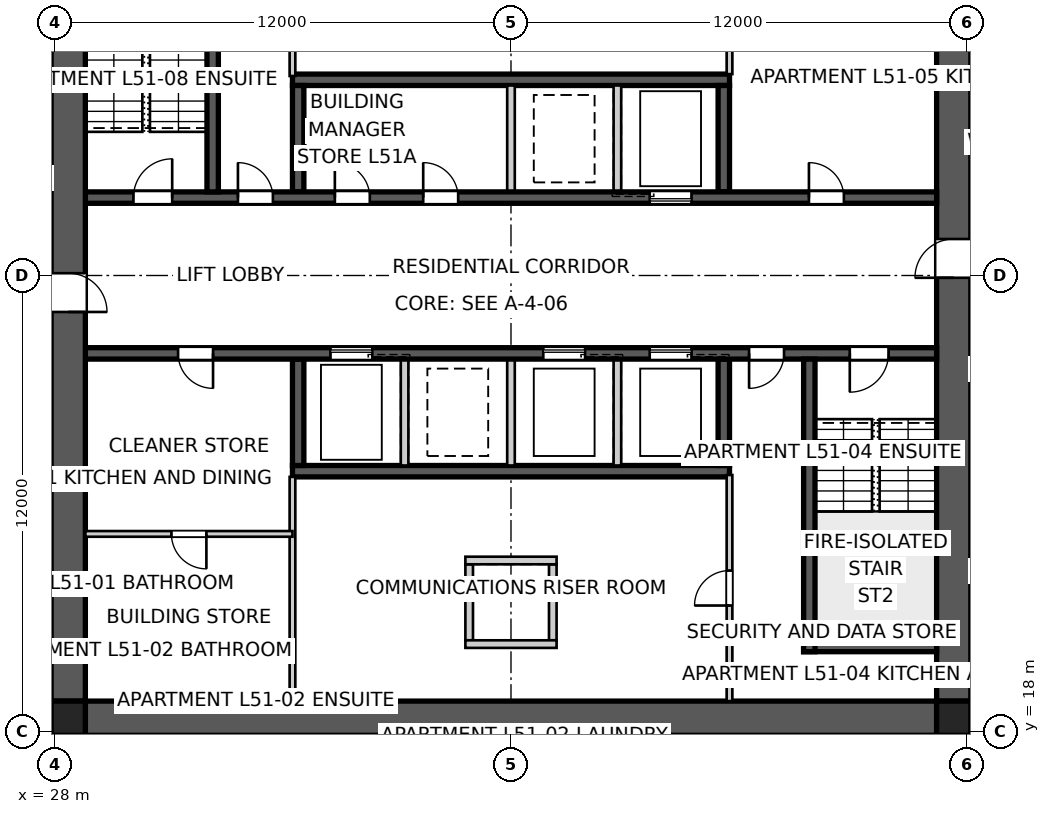
"""IFC4 building model, lengths in metres.
Left out: names, types, materials, properties, quantities, classifications, styles, units other than length and angle.
Written with IfcOpenShell. Run it as: python <this file> out.ifc"""

import sys

from ifc_helpers import new_model, si_unit, direction, frame, frame_2d, origin, origin_2d, place, context, subcontext, project, spatial, polyline, rectangle, outline, extrude, element, fill, save


model = new_model("IFC4")
c1 = context("Model", 3, precision=1e-05, world=origin(), true_north=direction((0.0, 1.0)))
c2 = subcontext(c1, "Body", "Model", "MODEL_VIEW")
j1 = project(units=[si_unit("LENGTHUNIT", "METRE"), si_unit("PLANEANGLEUNIT", "RADIAN")], contexts=[c1])
p1 = place(None, origin())
s1 = spatial("IfcSite", under=j1, at=p1, CompositionType="ELEMENT")
p2 = place(p1, origin())
s2 = spatial("IfcBuilding", under=s1, at=p2, CompositionType="ELEMENT")
p3 = place(p2, frame((0.0, 0.0, 186.2)))
s3 = spatial("IfcBuildingStorey", under=s2, at=p3, CompositionType="ELEMENT", Elevation=186.2)
p4 = place(p3, frame((51.2, 18.35, 0.0), z_axis=(0.0, 0.0, 1.0), x_axis=(-1.0, 0.0, 0.0)))
e1 = element("IfcWall", 1, at=p4, inside=s3, PredefinedType="SHEAR", context=c2, shape_type="SweptSolid", body=[
    extrude(outline(polyline([(0.0, -0.45), (22.4, -0.45), (22.4, -0.025), (22.85, -0.025), (22.85, 0.025), (22.4, 0.025), (22.4, 0.45), (0.0, 0.45), (0.0, 0.025), (-0.45, 0.025), (-0.45, -0.025), (0.0, -0.025), (0.0, -0.45)])), origin(), (0.0, 0.0, 1.0), 3.4),
])
p5 = place(p3, frame((51.65, 18.8, 0.0), z_axis=(0.0, 0.0, 1.0), x_axis=(0.0, 1.0, 0.0)))
e2 = element("IfcWall", 2, at=p5, inside=s3, PredefinedType="SHEAR", context=c2, shape_type="SweptSolid", body=[
    extrude(outline(polyline([(0.0, -0.45), (22.4, -0.45), (22.4, -0.025), (22.85, -0.025), (22.85, 0.025), (22.4, 0.025), (22.4, 0.45), (0.0, 0.45), (0.0, 0.025), (-0.45, 0.025), (-0.45, -0.025), (0.0, -0.025), (0.0, -0.45)])), origin(), (0.0, 0.0, 1.0), 3.4),
])
p6 = place(p5, frame((11.14, 0.0, 0.0)))
e3 = element("IfcOpeningElement", 3, at=p6, cuts=e2, PredefinedType="OPENING", context=c2, shape_type="SweptSolid", body=[
    extrude(rectangle(XDim=1.02, YDim=2.4, at=frame_2d((0.51, 1.2))), frame((0.0, 0.46, 0.0), z_axis=(0.0, -1.0, 0.0), x_axis=(1.0, 0.0, 0.0)), (0.0, 0.0, 1.0), 0.92),
])
p7 = place(p3, frame((28.35, 41.2, 0.0), z_axis=(0.0, 0.0, 1.0), x_axis=(0.0, -1.0, 0.0)))
e4 = element("IfcWall", 4, at=p7, inside=s3, PredefinedType="SHEAR", context=c2, shape_type="SweptSolid", body=[
    extrude(outline(polyline([(0.0, -0.45), (22.4, -0.45), (22.4, -0.025), (22.85, -0.025), (22.85, 0.025), (22.4, 0.025), (22.4, 0.45), (0.0, 0.45), (0.0, 0.025), (-0.45, 0.025), (-0.45, -0.025), (0.0, -0.025), (0.0, -0.45)])), origin(), (0.0, 0.0, 1.0), 3.4),
])
p8 = place(p7, frame((11.14, 0.0, 0.0)))
e5 = element("IfcOpeningElement", 5, at=p8, cuts=e4, PredefinedType="OPENING", context=c2, shape_type="SweptSolid", body=[
    extrude(rectangle(XDim=1.02, YDim=2.4, at=frame_2d((0.51, 1.2))), frame((0.0, 0.46, 0.0), z_axis=(0.0, -1.0, 0.0), x_axis=(1.0, 0.0, 0.0)), (0.0, 0.0, 1.0), 0.92),
])
p9 = place(p3, frame((28.8, 32.05, 0.0), z_axis=(0.0, 0.0, 1.0), x_axis=(1.0, 0.0, 0.0)))
e6 = element("IfcWall", 6, at=p9, inside=s3, PredefinedType="SHEAR", context=c2, shape_type="SweptSolid", body=[
    extrude(rectangle(XDim=22.4, YDim=0.3, at=frame_2d((11.2, 0.0))), origin(), (0.0, 0.0, 1.0), 3.4),
])
p10 = place(p9, frame((19.04, 0.0, 0.0)))
e7 = element("IfcOpeningElement", 7, at=p10, cuts=e6, PredefinedType="OPENING", context=c2, shape_type="SweptSolid", body=[
    extrude(rectangle(XDim=0.92, YDim=2.1, at=frame_2d((0.46, 1.05))), frame((0.0, 0.16, 0.0), z_axis=(0.0, -1.0, 0.0), x_axis=(1.0, 0.0, 0.0)), (0.0, 0.0, 1.0), 0.32),
])
p11 = place(p9, frame((1.265, 0.0, 0.0)))
e8 = element("IfcOpeningElement", 8, at=p11, cuts=e6, PredefinedType="OPENING", context=c2, shape_type="SweptSolid", body=[
    extrude(rectangle(XDim=1.02, YDim=2.1, at=frame_2d((0.51, 1.05))), frame((0.0, 0.16, 0.0), z_axis=(0.0, -1.0, 0.0), x_axis=(1.0, 0.0, 0.0)), (0.0, 0.0, 1.0), 0.32),
])
p12 = place(p9, frame((4.015, 0.0, 0.0)))
e9 = element("IfcOpeningElement", 9, at=p12, cuts=e6, PredefinedType="OPENING", context=c2, shape_type="SweptSolid", body=[
    extrude(rectangle(XDim=0.92, YDim=2.1, at=frame_2d((0.46, 1.05))), frame((0.0, 0.16, 0.0), z_axis=(0.0, -1.0, 0.0), x_axis=(1.0, 0.0, 0.0)), (0.0, 0.0, 1.0), 0.32),
])
p13 = place(p9, frame((6.565, 0.0, 0.0)))
e10 = element("IfcOpeningElement", 10, at=p13, cuts=e6, PredefinedType="OPENING", context=c2, shape_type="SweptSolid", body=[
    extrude(rectangle(XDim=0.92, YDim=2.1, at=frame_2d((0.46, 1.05))), frame((0.0, 0.16, 0.0), z_axis=(0.0, -1.0, 0.0), x_axis=(1.0, 0.0, 0.0)), (0.0, 0.0, 1.0), 0.32),
])
p14 = place(p9, frame((8.89, 0.0, 0.0)))
e11 = element("IfcOpeningElement", 11, at=p14, cuts=e6, PredefinedType="OPENING", context=c2, shape_type="SweptSolid", body=[
    extrude(rectangle(XDim=0.92, YDim=2.1, at=frame_2d((0.46, 1.05))), frame((0.0, 0.16, 0.0), z_axis=(0.0, -1.0, 0.0), x_axis=(1.0, 0.0, 0.0)), (0.0, 0.0, 1.0), 0.32),
])
p15 = place(p9, frame((14.85, 0.0, 0.0)))
e12 = element("IfcOpeningElement", 12, at=p15, cuts=e6, PredefinedType="OPENING", context=c2, shape_type="SweptSolid", body=[
    extrude(rectangle(XDim=1.1, YDim=2.1, at=frame_2d((0.55, 1.05))), frame((0.0, 0.16, 0.0), z_axis=(0.0, -1.0, 0.0), x_axis=(1.0, 0.0, 0.0)), (0.0, 0.0, 1.0), 0.32),
])
p16 = place(p3, frame((51.2, 27.95, 0.0), z_axis=(0.0, 0.0, 1.0), x_axis=(-1.0, 0.0, 0.0)))
e13 = element("IfcWall", 13, at=p16, inside=s3, PredefinedType="SHEAR", context=c2, shape_type="SweptSolid", body=[
    extrude(rectangle(XDim=22.4, YDim=0.3, at=frame_2d((11.2, 0.0))), origin(), (0.0, 0.0, 1.0), 3.4),
])
p17 = place(p16, frame((19.04, 0.0, 0.0)))
e14 = element("IfcOpeningElement", 14, at=p17, cuts=e13, PredefinedType="OPENING", context=c2, shape_type="SweptSolid", body=[
    extrude(rectangle(XDim=0.92, YDim=2.1, at=frame_2d((0.46, 1.05))), frame((0.0, 0.16, 0.0), z_axis=(0.0, -1.0, 0.0), x_axis=(1.0, 0.0, 0.0)), (0.0, 0.0, 1.0), 0.32),
])
p18 = place(p16, frame((1.265, 0.0, 0.0)))
e15 = element("IfcOpeningElement", 15, at=p18, cuts=e13, PredefinedType="OPENING", context=c2, shape_type="SweptSolid", body=[
    extrude(rectangle(XDim=1.02, YDim=2.1, at=frame_2d((0.51, 1.05))), frame((0.0, 0.16, 0.0), z_axis=(0.0, -1.0, 0.0), x_axis=(1.0, 0.0, 0.0)), (0.0, 0.0, 1.0), 0.32),
])
p19 = place(p16, frame((4.015, 0.0, 0.0)))
e16 = element("IfcOpeningElement", 16, at=p19, cuts=e13, PredefinedType="OPENING", context=c2, shape_type="SweptSolid", body=[
    extrude(rectangle(XDim=0.92, YDim=2.1, at=frame_2d((0.46, 1.05))), frame((0.0, 0.16, 0.0), z_axis=(0.0, -1.0, 0.0), x_axis=(1.0, 0.0, 0.0)), (0.0, 0.0, 1.0), 0.32),
])
p20 = place(p16, frame((6.45, 0.0, 0.0)))
e17 = element("IfcOpeningElement", 17, at=p20, cuts=e13, PredefinedType="OPENING", context=c2, shape_type="SweptSolid", body=[
    extrude(rectangle(XDim=1.1, YDim=2.1, at=frame_2d((0.55, 1.05))), frame((0.0, 0.16, 0.0), z_axis=(0.0, -1.0, 0.0), x_axis=(1.0, 0.0, 0.0)), (0.0, 0.0, 1.0), 0.32),
])
p21 = place(p16, frame((9.25, 0.0, 0.0)))
e18 = element("IfcOpeningElement", 18, at=p21, cuts=e13, PredefinedType="OPENING", context=c2, shape_type="SweptSolid", body=[
    extrude(rectangle(XDim=1.1, YDim=2.1, at=frame_2d((0.55, 1.05))), frame((0.0, 0.16, 0.0), z_axis=(0.0, -1.0, 0.0), x_axis=(1.0, 0.0, 0.0)), (0.0, 0.0, 1.0), 0.32),
])
p22 = place(p16, frame((14.85, 0.0, 0.0)))
e19 = element("IfcOpeningElement", 19, at=p22, cuts=e13, PredefinedType="OPENING", context=c2, shape_type="SweptSolid", body=[
    extrude(rectangle(XDim=1.1, YDim=2.1, at=frame_2d((0.55, 1.05))), frame((0.0, 0.16, 0.0), z_axis=(0.0, -1.0, 0.0), x_axis=(1.0, 0.0, 0.0)), (0.0, 0.0, 1.0), 0.32),
])
for number, where, z_axis, x_axis in (
    (20, (34.25, 35.15, 0.0), (0.0, 0.0, 1.0), (1.0, 0.0, 0.0)),
    (21, (45.75, 24.85, 0.0), (0.0, 0.0, 1.0), (-1.0, 0.0, 0.0)),
):
    element("IfcWall", number, at=place(p3, frame(where, z_axis=z_axis, x_axis=x_axis)), inside=s3, PredefinedType="SHEAR", context=c2, shape_type="SweptSolid", body=[
        extrude(rectangle(XDim=11.5, YDim=0.3, at=frame_2d((5.75, 0.0))), origin(), (0.0, 0.0, 1.0), 3.4),
    ])
for number, where, z_axis, x_axis in (
    (22, (34.4, 32.2, 0.0), (0.0, 0.0, 1.0), (0.0, 1.0, 0.0)),
    (23, (45.6, 27.8, 0.0), (0.0, 0.0, 1.0), (0.0, -1.0, 0.0)),
):
    element("IfcWall", number, at=place(p3, frame(where, z_axis=z_axis, x_axis=x_axis)), inside=s3, PredefinedType="SHEAR", context=c2, shape_type="SweptSolid", body=[
        extrude(rectangle(XDim=2.8, YDim=0.3, at=frame_2d((1.4, 0.0))), origin(), (0.0, 0.0, 1.0), 3.4),
    ])
for number, where, z_axis, x_axis in (
    (24, (42.8, 27.8, 0.0), (0.0, 0.0, 1.0), (0.0, -1.0, 0.0)),
    (25, (40.0, 32.2, 0.0), (0.0, 0.0, 1.0), (0.0, 1.0, 0.0)),
    (26, (40.0, 27.8, 0.0), (0.0, 0.0, 1.0), (0.0, -1.0, 0.0)),
    (27, (42.8, 32.2, 0.0), (0.0, 0.0, 1.0), (0.0, 1.0, 0.0)),
    (28, (37.2, 27.8, 0.0), (0.0, 0.0, 1.0), (0.0, -1.0, 0.0)),
):
    element("IfcWall", number, at=place(p3, frame(where, z_axis=z_axis, x_axis=x_axis)), inside=s3, PredefinedType="SOLIDWALL", context=c2, shape_type="SweptSolid", body=[
        extrude(rectangle(XDim=2.8, YDim=0.2, at=frame_2d((1.4, 0.0))), origin(), (0.0, 0.0, 1.0), 3.4),
    ])
for number, where, z_axis, x_axis in (
    (29, (45.6, 32.2, 0.0), (0.0, 0.0, 1.0), (0.0, 1.0, 0.0)),
    (30, (34.4, 27.8, 0.0), (0.0, 0.0, 1.0), (0.0, -1.0, 0.0)),
):
    element("IfcWall", number, at=place(p3, frame(where, z_axis=z_axis, x_axis=x_axis)), inside=s3, PredefinedType="SHEAR", context=c2, shape_type="SweptSolid", body=[
        extrude(rectangle(XDim=2.8, YDim=0.3, at=frame_2d((1.4, 0.0))), origin(), (0.0, 0.0, 1.0), 3.4),
    ])
for number, where, z_axis, x_axis in (
    (31, (32.15, 32.2, 0.0), (0.0, 0.0, 1.0), (0.0, 1.0, 0.0)),
    (32, (47.85, 27.8, 0.0), (0.0, 0.0, 1.0), (0.0, -1.0, 0.0)),
):
    element("IfcWall", number, at=place(p3, frame(where, z_axis=z_axis, x_axis=x_axis)), inside=s3, PredefinedType="SHEAR", context=c2, shape_type="SweptSolid", body=[
        extrude(rectangle(XDim=7.7, YDim=0.3, at=frame_2d((3.85, 0.0))), origin(), (0.0, 0.0, 1.0), 3.4),
    ])
p23 = place(p3, frame((51.2, 20.25, 0.0), z_axis=(0.0, 0.0, 1.0), x_axis=(-1.0, 0.0, 0.0)))
e33 = element("IfcWall", 33, at=p23, inside=s3, PredefinedType="SHEAR", context=c2, shape_type="SweptSolid", body=[
    extrude(rectangle(XDim=3.5, YDim=0.3, at=frame_2d((1.75, 0.0))), origin(), (0.0, 0.0, 1.0), 3.4),
])
for number, where, z_axis, x_axis in (
    (34, (38.9, 22.4, 0.0), (0.0, 0.0, 1.0), (0.0, -1.0, 0.0)),
    (35, (41.1, 22.4, 0.0), (0.0, 0.0, 1.0), (0.0, -1.0, 0.0)),
):
    element("IfcWall", number, at=place(p3, frame(where, z_axis=z_axis, x_axis=x_axis)), inside=s3, PredefinedType="SOLIDWALL", context=c2, shape_type="SweptSolid", body=[
        extrude(rectangle(XDim=2.0, YDim=0.2, at=frame_2d((1.0, 0.0))), origin(), (0.0, 0.0, 1.0), 3.4),
    ])
for number, where, z_axis, x_axis in (
    (36, (38.8, 22.5, 0.0), (0.0, 0.0, 1.0), (1.0, 0.0, 0.0)),
    (37, (38.8, 20.3, 0.0), (0.0, 0.0, 1.0), (1.0, 0.0, 0.0)),
):
    element("IfcWall", number, at=place(p3, frame(where, z_axis=z_axis, x_axis=x_axis)), inside=s3, PredefinedType="SOLIDWALL", context=c2, shape_type="SweptSolid", body=[
        extrude(rectangle(XDim=2.4, YDim=0.2, at=frame_2d((1.2, 0.0))), origin(), (0.0, 0.0, 1.0), 3.4),
    ])
for number, where, z_axis, x_axis in (
    (38, (28.35, 18.35, 0.0), (0.0, 0.0, 1.0), (1.0, 0.0, 0.0)),
    (39, (51.65, 18.35, 0.0), (0.0, 0.0, 1.0), (1.0, 0.0, 0.0)),
):
    element("IfcColumn", number, at=place(p3, frame(where, z_axis=z_axis, x_axis=x_axis)), inside=s3, PredefinedType="COLUMN", context=c2, shape_type="SweptSolid", body=[
        extrude(rectangle(XDim=0.9, YDim=0.9, at=origin_2d()), origin(), (0.0, 0.0, 1.0), 3.4),
    ])
p24 = place(p3, frame((34.25, 41.2, 0.0), z_axis=(0.0, 0.0, 1.0), x_axis=(0.0, -1.0, 0.0)))
e40 = element("IfcWall", 40, at=p24, inside=s3, PredefinedType="SOLIDWALL", context=c2, shape_type="SweptSolid", body=[
    extrude(rectangle(XDim=5.95, YDim=0.15, at=frame_2d((2.975, 0.0))), origin(), (0.0, 0.0, 1.0), 3.25),
])
p25 = place(p24, frame((2.515, 0.0, 0.0)))
e41 = element("IfcOpeningElement", 41, at=p25, cuts=e40, PredefinedType="OPENING", context=c2, shape_type="SweptSolid", body=[
    extrude(rectangle(XDim=0.92, YDim=2.1, at=frame_2d((0.46, 1.05))), frame((0.0, 0.085, 0.0), z_axis=(0.0, -1.0, 0.0), x_axis=(1.0, 0.0, 0.0)), (0.0, 0.0, 1.0), 0.17),
])
p26 = place(p3, frame((45.75, 41.2, 0.0), z_axis=(0.0, 0.0, 1.0), x_axis=(0.0, -1.0, 0.0)))
e42 = element("IfcWall", 42, at=p26, inside=s3, PredefinedType="SOLIDWALL", context=c2, shape_type="SweptSolid", body=[
    extrude(rectangle(XDim=5.9, YDim=0.15, at=frame_2d((2.95, 0.0))), origin(), (0.0, 0.0, 1.0), 3.25),
])
p27 = place(p3, frame((45.75, 18.8, 0.0), z_axis=(0.0, 0.0, 1.0), x_axis=(0.0, 1.0, 0.0)))
e43 = element("IfcWall", 43, at=p27, inside=s3, PredefinedType="SOLIDWALL", context=c2, shape_type="SweptSolid", body=[
    extrude(rectangle(XDim=5.95, YDim=0.15, at=frame_2d((2.975, 0.0))), origin(), (0.0, 0.0, 1.0), 3.25),
])
p28 = place(p27, frame((2.515, 0.0, 0.0)))
e44 = element("IfcOpeningElement", 44, at=p28, cuts=e43, PredefinedType="OPENING", context=c2, shape_type="SweptSolid", body=[
    extrude(rectangle(XDim=0.92, YDim=2.1, at=frame_2d((0.46, 1.05))), frame((0.0, 0.085, 0.0), z_axis=(0.0, -1.0, 0.0), x_axis=(1.0, 0.0, 0.0)), (0.0, 0.0, 1.0), 0.17),
])
p29 = place(p3, frame((34.25, 18.8, 0.0), z_axis=(0.0, 0.0, 1.0), x_axis=(0.0, 1.0, 0.0)))
e45 = element("IfcWall", 45, at=p29, inside=s3, PredefinedType="SOLIDWALL", context=c2, shape_type="SweptSolid", body=[
    extrude(rectangle(XDim=5.9, YDim=0.15, at=frame_2d((2.95, 0.0))), origin(), (0.0, 0.0, 1.0), 3.25),
])
p30 = place(p3, frame((34.25, 23.2, 0.0), z_axis=(0.0, 0.0, 1.0), x_axis=(-1.0, 0.0, 0.0)))
e46 = element("IfcWall", 46, at=p30, inside=s3, PredefinedType="SOLIDWALL", context=c2, shape_type="SweptSolid", body=[
    extrude(rectangle(XDim=5.45, YDim=0.15, at=frame_2d((2.725, 0.0))), origin(), (0.0, 0.0, 1.0), 3.25),
])
p31 = place(p30, frame((2.265, 0.0, 0.0)))
e47 = element("IfcOpeningElement", 47, at=p31, cuts=e46, PredefinedType="OPENING", context=c2, shape_type="SweptSolid", body=[
    extrude(rectangle(XDim=0.92, YDim=2.1, at=frame_2d((0.46, 1.05))), frame((0.0, 0.085, 0.0), z_axis=(0.0, -1.0, 0.0), x_axis=(1.0, 0.0, 0.0)), (0.0, 0.0, 1.0), 0.17),
])
p32 = place(p3, frame((27.9, 17.95, 0.0), z_axis=(0.0, 0.0, 1.0), x_axis=(0.0, -1.0, 0.0)))
e48 = element("IfcWall", 48, at=p32, inside=s3, PredefinedType="PARTITIONING", context=c2, shape_type="SweptSolid", body=[
    extrude(rectangle(XDim=2.3, YDim=0.2, at=frame_2d((1.15, 0.0))), origin(), (0.0, 0.0, 1.0), 3.25),
])
p33 = place(p3, frame((52.1, 15.65, 0.0), z_axis=(0.0, 0.0, 1.0), x_axis=(0.0, 1.0, 0.0)))
e49 = element("IfcWall", 49, at=p33, inside=s3, PredefinedType="PARTITIONING", context=c2, shape_type="SweptSolid", body=[
    extrude(rectangle(XDim=3.17, YDim=0.2, at=frame_2d((1.585, 0.0))), origin(), (0.0, 0.0, 1.0), 3.25),
])
p34 = place(p10, origin())
e50 = element("IfcDoor", 50, at=p34, inside=s3, OperationType="SINGLE_SWING_LEFT", PredefinedType="DOOR", context=c2, shape_type="SweptSolid", body=[
    extrude(rectangle(XDim=0.92, YDim=2.1, at=frame_2d((0.46, 1.05))), frame((0.0, 0.025, 0.0), z_axis=(0.0, -1.0, 0.0), x_axis=(1.0, 0.0, 0.0)), (0.0, 0.0, 1.0), 0.05),
])
fill(e7, e50)
p35 = place(p17, origin())
e51 = element("IfcDoor", 51, at=p35, inside=s3, OperationType="SINGLE_SWING_LEFT", PredefinedType="DOOR", context=c2, shape_type="SweptSolid", body=[
    extrude(rectangle(XDim=0.92, YDim=2.1, at=frame_2d((0.46, 1.05))), frame((0.0, 0.025, 0.0), z_axis=(0.0, -1.0, 0.0), x_axis=(1.0, 0.0, 0.0)), (0.0, 0.0, 1.0), 0.05),
])
fill(e14, e51)
p36 = place(p18, origin())
e52 = element("IfcDoor", 52, at=p36, inside=s3, OperationType="SINGLE_SWING_RIGHT", PredefinedType="DOOR", context=c2, shape_type="SweptSolid", body=[
    extrude(rectangle(XDim=1.02, YDim=2.1, at=frame_2d((0.51, 1.05))), frame((0.0, 0.025, 0.0), z_axis=(0.0, -1.0, 0.0), x_axis=(1.0, 0.0, 0.0)), (0.0, 0.0, 1.0), 0.05),
])
fill(e15, e52)
p37 = place(p11, origin())
e53 = element("IfcDoor", 53, at=p37, inside=s3, OperationType="SINGLE_SWING_RIGHT", PredefinedType="DOOR", context=c2, shape_type="SweptSolid", body=[
    extrude(rectangle(XDim=1.02, YDim=2.1, at=frame_2d((0.51, 1.05))), frame((0.0, 0.025, 0.0), z_axis=(0.0, -1.0, 0.0), x_axis=(1.0, 0.0, 0.0)), (0.0, 0.0, 1.0), 0.05),
])
fill(e8, e53)
p38 = place(p12, origin())
e54 = element("IfcDoor", 54, at=p38, inside=s3, OperationType="SINGLE_SWING_LEFT", PredefinedType="DOOR", context=c2, shape_type="SweptSolid", body=[
    extrude(rectangle(XDim=0.92, YDim=2.1, at=frame_2d((0.46, 1.05))), frame((0.0, 0.025, 0.0), z_axis=(0.0, -1.0, 0.0), x_axis=(1.0, 0.0, 0.0)), (0.0, 0.0, 1.0), 0.05),
])
fill(e9, e54)
p39 = place(p19, origin())
e55 = element("IfcDoor", 55, at=p39, inside=s3, OperationType="SINGLE_SWING_RIGHT", PredefinedType="DOOR", context=c2, shape_type="SweptSolid", body=[
    extrude(rectangle(XDim=0.92, YDim=2.1, at=frame_2d((0.46, 1.05))), frame((0.0, 0.025, 0.0), z_axis=(0.0, -1.0, 0.0), x_axis=(1.0, 0.0, 0.0)), (0.0, 0.0, 1.0), 0.05),
])
fill(e16, e55)
p40 = place(p31, origin())
e56 = element("IfcDoor", 56, at=p40, inside=s3, OperationType="SINGLE_SWING_LEFT", PredefinedType="DOOR", context=c2, shape_type="SweptSolid", body=[
    extrude(rectangle(XDim=0.92, YDim=2.1, at=frame_2d((0.46, 1.05))), frame((0.0, 0.025, 0.0), z_axis=(0.0, -1.0, 0.0), x_axis=(1.0, 0.0, 0.0)), (0.0, 0.0, 1.0), 0.05),
])
fill(e47, e56)
p41 = place(p28, origin())
e57 = element("IfcDoor", 57, at=p41, inside=s3, OperationType="SINGLE_SWING_LEFT", PredefinedType="DOOR", context=c2, shape_type="SweptSolid", body=[
    extrude(rectangle(XDim=0.92, YDim=2.1, at=frame_2d((0.46, 1.05))), frame((0.0, 0.025, 0.0), z_axis=(0.0, -1.0, 0.0), x_axis=(1.0, 0.0, 0.0)), (0.0, 0.0, 1.0), 0.05),
])
fill(e44, e57)
p42 = place(p13, origin())
e58 = element("IfcDoor", 58, at=p42, inside=s3, OperationType="SINGLE_SWING_LEFT", PredefinedType="DOOR", context=c2, shape_type="SweptSolid", body=[
    extrude(rectangle(XDim=0.92, YDim=2.1, at=frame_2d((0.46, 1.05))), frame((0.0, 0.025, 0.0), z_axis=(0.0, -1.0, 0.0), x_axis=(1.0, 0.0, 0.0)), (0.0, 0.0, 1.0), 0.05),
])
fill(e10, e58)
p43 = place(p14, origin())
e59 = element("IfcDoor", 59, at=p43, inside=s3, OperationType="SINGLE_SWING_LEFT", PredefinedType="DOOR", context=c2, shape_type="SweptSolid", body=[
    extrude(rectangle(XDim=0.92, YDim=2.1, at=frame_2d((0.46, 1.05))), frame((0.0, 0.025, 0.0), z_axis=(0.0, -1.0, 0.0), x_axis=(1.0, 0.0, 0.0)), (0.0, 0.0, 1.0), 0.05),
])
fill(e11, e59)
p44 = place(p6, origin())
e60 = element("IfcDoor", 60, at=p44, inside=s3, OperationType="SINGLE_SWING_LEFT", PredefinedType="DOOR", context=c2, shape_type="SweptSolid", body=[
    extrude(rectangle(XDim=1.02, YDim=2.4, at=frame_2d((0.51, 1.2))), frame((0.0, 0.025, 0.0), z_axis=(0.0, -1.0, 0.0), x_axis=(1.0, 0.0, 0.0)), (0.0, 0.0, 1.0), 0.05),
])
fill(e3, e60)
p45 = place(p8, origin())
e61 = element("IfcDoor", 61, at=p45, inside=s3, OperationType="SINGLE_SWING_RIGHT", PredefinedType="DOOR", context=c2, shape_type="SweptSolid", body=[
    extrude(rectangle(XDim=1.02, YDim=2.4, at=frame_2d((0.51, 1.2))), frame((0.0, 0.025, 0.0), z_axis=(0.0, -1.0, 0.0), x_axis=(1.0, 0.0, 0.0)), (0.0, 0.0, 1.0), 0.05),
])
fill(e5, e61)
p46 = place(p20, origin())
e62 = element("IfcDoor", 62, at=p46, inside=s3, OperationType="SLIDING_TO_LEFT", PredefinedType="DOOR", context=c2, shape_type="SweptSolid", body=[
    extrude(rectangle(XDim=1.1, YDim=2.1, at=frame_2d((0.55, 1.05))), frame((0.0, 0.025, 0.0), z_axis=(0.0, -1.0, 0.0), x_axis=(1.0, 0.0, 0.0)), (0.0, 0.0, 1.0), 0.05),
])
fill(e17, e62)
p47 = place(p21, origin())
e63 = element("IfcDoor", 63, at=p47, inside=s3, OperationType="SLIDING_TO_LEFT", PredefinedType="DOOR", context=c2, shape_type="SweptSolid", body=[
    extrude(rectangle(XDim=1.1, YDim=2.1, at=frame_2d((0.55, 1.05))), frame((0.0, 0.025, 0.0), z_axis=(0.0, -1.0, 0.0), x_axis=(1.0, 0.0, 0.0)), (0.0, 0.0, 1.0), 0.05),
])
fill(e18, e63)
p48 = place(p15, origin())
e64 = element("IfcDoor", 64, at=p48, inside=s3, OperationType="SLIDING_TO_LEFT", PredefinedType="DOOR", context=c2, shape_type="SweptSolid", body=[
    extrude(rectangle(XDim=1.1, YDim=2.1, at=frame_2d((0.55, 1.05))), frame((0.0, 0.025, 0.0), z_axis=(0.0, -1.0, 0.0), x_axis=(1.0, 0.0, 0.0)), (0.0, 0.0, 1.0), 0.05),
])
fill(e12, e64)
p49 = place(p22, origin())
e65 = element("IfcDoor", 65, at=p49, inside=s3, OperationType="SLIDING_TO_LEFT", PredefinedType="DOOR", context=c2, shape_type="SweptSolid", body=[
    extrude(rectangle(XDim=1.1, YDim=2.1, at=frame_2d((0.55, 1.05))), frame((0.0, 0.025, 0.0), z_axis=(0.0, -1.0, 0.0), x_axis=(1.0, 0.0, 0.0)), (0.0, 0.0, 1.0), 0.05),
])
fill(e19, e65)
save(model, sys.argv[1])
